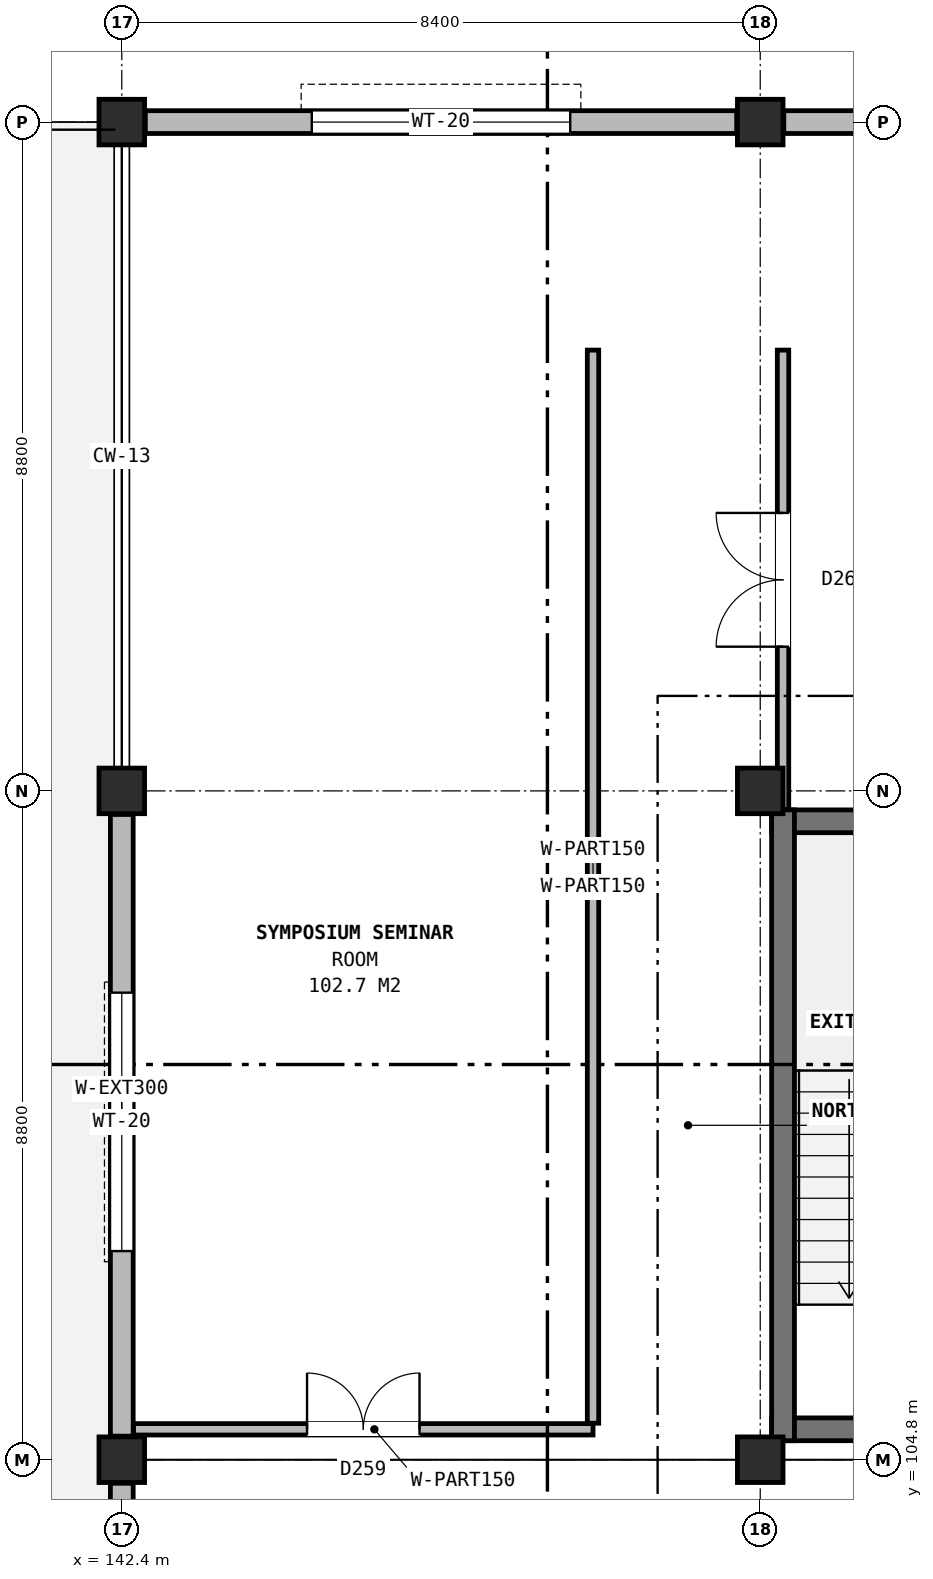
"""IFC4 building model, lengths in metres.
Left out: names, types, materials, properties, quantities, classifications, styles, units other than length and angle.
Written with IfcOpenShell. Run it as: python <this file> out.ifc"""

import sys

from ifc_helpers import new_model, si_unit, direction, frame, frame_2d, origin, origin_2d, place, context, subcontext, project, spatial, rectangle, extrude, element, fill, save


model = new_model("IFC4")
c1 = context("Model", 3, precision=1e-05, world=origin(), true_north=direction((0.0, 1.0)))
c2 = subcontext(c1, "Body", "Model", "MODEL_VIEW")
j1 = project(units=[si_unit("LENGTHUNIT", "METRE"), si_unit("PLANEANGLEUNIT", "RADIAN")], contexts=[c1])
p1 = place(None, origin())
s1 = spatial("IfcSite", under=j1, at=p1, CompositionType="ELEMENT")
p2 = place(p1, origin())
s2 = spatial("IfcBuilding", under=s1, at=p2, CompositionType="ELEMENT")
p3 = place(p2, frame((0.0, 0.0, 48.2)))
s3 = spatial("IfcBuildingStorey", under=s2, at=p3, CompositionType="ELEMENT", Elevation=48.2)
for number, where, z_axis, x_axis in (
    (1, (142.4, 104.8, 0.0), (0.0, 0.0, 1.0), (1.0, 0.0, 0.0)),
    (2, (142.4, 113.6, 0.0), (0.0, 0.0, 1.0), (1.0, 0.0, 0.0)),
    (3, (142.4, 122.4, 0.0), (0.0, 0.0, 1.0), (1.0, 0.0, 0.0)),
    (4, (150.8, 104.8, 0.0), (0.0, 0.0, 1.0), (1.0, 0.0, 0.0)),
    (5, (150.8, 113.6, 0.0), (0.0, 0.0, 1.0), (1.0, 0.0, 0.0)),
    (6, (150.8, 122.4, 0.0), (0.0, 0.0, 1.0), (1.0, 0.0, 0.0)),
):
    element("IfcColumn", number, at=place(p3, frame(where, z_axis=z_axis, x_axis=x_axis)), inside=s3, PredefinedType="COLUMN", context=c2, shape_type="SweptSolid", body=[
        extrude(rectangle(XDim=0.6, YDim=0.6, at=origin_2d()), origin(), (0.0, 0.0, 1.0), 4.0),
    ])
p4 = place(p3, frame((158.89, 122.4, 0.0), z_axis=(0.0, 0.0, 1.0), x_axis=(-1.0, 0.0, 0.0)))
e7 = element("IfcWall", 7, at=p4, inside=s3, PredefinedType="SOLIDWALL", context=c2, shape_type="SweptSolid", body=[
    extrude(rectangle(XDim=7.78, YDim=0.3, at=frame_2d((3.89, 0.0))), origin(), (0.0, 0.0, 1.0), 3.25),
])
p5 = place(p4, frame((2.52, 0.0, 0.9)))
e8 = element("IfcOpeningElement", 8, at=p5, cuts=e7, PredefinedType="OPENING", context=c2, shape_type="SweptSolid", body=[
    extrude(rectangle(XDim=2.74, YDim=2.2, at=frame_2d((1.37, 1.1))), frame((0.0, 0.16, 0.0), z_axis=(0.0, -1.0, 0.0), x_axis=(1.0, 0.0, 0.0)), (0.0, 0.0, 1.0), 0.32),
])
p6 = place(p3, frame((150.49, 122.4, 0.0), z_axis=(0.0, 0.0, 1.0), x_axis=(-1.0, 0.0, 0.0)))
e9 = element("IfcWall", 9, at=p6, inside=s3, PredefinedType="SOLIDWALL", context=c2, shape_type="SweptSolid", body=[
    extrude(rectangle(XDim=7.78, YDim=0.3, at=frame_2d((3.89, 0.0))), origin(), (0.0, 0.0, 1.0), 3.25),
])
p7 = place(p6, frame((2.19, 0.0, 0.9)))
e10 = element("IfcOpeningElement", 10, at=p7, cuts=e9, PredefinedType="OPENING", context=c2, shape_type="SweptSolid", body=[
    extrude(rectangle(XDim=3.4, YDim=2.15, at=frame_2d((1.7, 1.075))), frame((0.0, 0.16, 0.0), z_axis=(0.0, -1.0, 0.0), x_axis=(1.0, 0.0, 0.0)), (0.0, 0.0, 1.0), 0.32),
])
p8 = place(p3, frame((142.4, 113.29, 0.0), z_axis=(0.0, 0.0, 1.0), x_axis=(0.0, -1.0, 0.0)))
e11 = element("IfcWall", 11, at=p8, inside=s3, PredefinedType="SOLIDWALL", context=c2, shape_type="SweptSolid", body=[
    extrude(rectangle(XDim=8.18, YDim=0.3, at=frame_2d((4.09, 0.0))), origin(), (0.0, 0.0, 1.0), 3.25),
])
p9 = place(p8, frame((2.345, 0.0, 0.9)))
e12 = element("IfcOpeningElement", 12, at=p9, cuts=e11, PredefinedType="OPENING", context=c2, shape_type="SweptSolid", body=[
    extrude(rectangle(XDim=3.4, YDim=2.15, at=frame_2d((1.7, 1.075))), frame((0.0, 0.16, 0.0), z_axis=(0.0, -1.0, 0.0), x_axis=(1.0, 0.0, 0.0)), (0.0, 0.0, 1.0), 0.32),
])
p10 = place(p3, frame((142.4, 104.49, 0.0), z_axis=(0.0, 0.0, 1.0), x_axis=(0.0, -1.0, 0.0)))
e13 = element("IfcWall", 13, at=p10, inside=s3, PredefinedType="SOLIDWALL", context=c2, shape_type="SweptSolid", body=[
    extrude(rectangle(XDim=8.18, YDim=0.3, at=frame_2d((4.09, 0.0))), origin(), (0.0, 0.0, 1.0), 3.25),
])
p11 = place(p10, frame((3.415, 0.0, 0.0)))
e14 = element("IfcOpeningElement", 14, at=p11, cuts=e13, PredefinedType="OPENING", context=c2, shape_type="SweptSolid", body=[
    extrude(rectangle(XDim=1.35, YDim=2.25, at=frame_2d((0.675, 1.125))), frame((0.0, 0.16, 0.0), z_axis=(0.0, -1.0, 0.0), x_axis=(1.0, 0.0, 0.0)), (0.0, 0.0, 1.0), 0.32),
])
for number, where, z_axis, x_axis in (
    (15, (150.95, 105.2, 0.0), (0.0, 0.0, 1.0), (1.0, 0.0, 0.0)),
    (16, (150.95, 113.2, 0.0), (0.0, 0.0, 1.0), (1.0, 0.0, 0.0)),
):
    element("IfcWall", number, at=place(p3, frame(where, z_axis=z_axis, x_axis=x_axis)), inside=s3, PredefinedType="SHEAR", context=c2, shape_type="SweptSolid", body=[
        extrude(rectangle(XDim=3.6, YDim=0.3, at=frame_2d((1.8, 0.0))), origin(), (0.0, 0.0, 1.0), 4.0),
    ])
p12 = place(p3, frame((151.1, 105.05, 0.0), z_axis=(0.0, 0.0, 1.0), x_axis=(0.0, 1.0, 0.0)))
e17 = element("IfcWall", 17, at=p12, inside=s3, PredefinedType="SHEAR", context=c2, shape_type="SweptSolid", body=[
    extrude(rectangle(XDim=8.3, YDim=0.3, at=frame_2d((4.15, 0.0))), origin(), (0.0, 0.0, 1.0), 4.0),
])
p13 = place(p3, frame((142.555, 105.2, 0.0), z_axis=(0.0, 0.0, 1.0), x_axis=(1.0, 0.0, 0.0)))
e18 = element("IfcWall", 18, at=p13, inside=s3, PredefinedType="PARTITIONING", context=c2, shape_type="SweptSolid", body=[
    extrude(rectangle(XDim=6.045, YDim=0.15, at=frame_2d((3.022, 0.0))), origin(), (0.0, 0.0, 1.0), 3.245),
])
p14 = place(p13, frame((2.282, 0.0, 0.0)))
e19 = element("IfcOpeningElement", 19, at=p14, cuts=e18, PredefinedType="OPENING", context=c2, shape_type="SweptSolid", body=[
    extrude(rectangle(XDim=1.48, YDim=2.2, at=frame_2d((0.74, 1.1))), frame((0.0, 0.085, 0.0), z_axis=(0.0, -1.0, 0.0), x_axis=(1.0, 0.0, 0.0)), (0.0, 0.0, 1.0), 0.17),
])
p15 = place(p3, frame((148.6, 105.28, 0.0), z_axis=(0.0, 0.0, 1.0), x_axis=(0.0, 1.0, 0.0)))
e20 = element("IfcWall", 20, at=p15, inside=s3, PredefinedType="PARTITIONING", context=c2, shape_type="SweptSolid", body=[
    extrude(rectangle(XDim=14.12, YDim=0.15, at=frame_2d((7.06, 0.0))), origin(), (0.0, 0.0, 1.0), 3.665),
])
p16 = place(p3, frame((151.1, 113.355, 0.0), z_axis=(0.0, 0.0, 1.0), x_axis=(0.0, 1.0, 0.0)))
e21 = element("IfcWall", 21, at=p16, inside=s3, PredefinedType="PARTITIONING", context=c2, shape_type="SweptSolid", body=[
    extrude(rectangle(XDim=6.045, YDim=0.15, at=frame_2d((3.022, 0.0))), origin(), (0.0, 0.0, 1.0), 3.245),
])
p17 = place(p16, frame((2.143, 0.0, 0.0)))
e22 = element("IfcOpeningElement", 22, at=p17, cuts=e21, PredefinedType="OPENING", context=c2, shape_type="SweptSolid", body=[
    extrude(rectangle(XDim=1.76, YDim=2.36, at=frame_2d((0.88, 1.18))), frame((0.0, 0.085, 0.0), z_axis=(0.0, -1.0, 0.0), x_axis=(1.0, 0.0, 0.0)), (0.0, 0.0, 1.0), 0.17),
])
p18 = place(p7, origin())
e23 = element("IfcWindow", 23, at=p18, inside=s3, PartitioningType="SINGLE_PANEL", PredefinedType="WINDOW", context=c2, shape_type="SweptSolid", body=[
    extrude(rectangle(XDim=3.4, YDim=2.15, at=frame_2d((1.7, 1.075))), frame((0.0, 0.03, 0.0), z_axis=(0.0, -1.0, 0.0), x_axis=(1.0, 0.0, 0.0)), (0.0, 0.0, 1.0), 0.06),
])
fill(e10, e23)
p19 = place(p9, origin())
e24 = element("IfcWindow", 24, at=p19, inside=s3, PartitioningType="SINGLE_PANEL", PredefinedType="WINDOW", context=c2, shape_type="SweptSolid", body=[
    extrude(rectangle(XDim=3.4, YDim=2.15, at=frame_2d((1.7, 1.075))), frame((0.0, 0.03, 0.0), z_axis=(0.0, -1.0, 0.0), x_axis=(1.0, 0.0, 0.0)), (0.0, 0.0, 1.0), 0.06),
])
fill(e12, e24)
p20 = place(p14, origin())
e25 = element("IfcDoor", 25, at=p20, inside=s3, OperationType="DOUBLE_DOOR_SINGLE_SWING", PredefinedType="DOOR", context=c2, shape_type="SweptSolid", body=[
    extrude(rectangle(XDim=1.48, YDim=2.2, at=frame_2d((0.74, 1.1))), frame((0.0, 0.025, 0.0), z_axis=(0.0, -1.0, 0.0), x_axis=(1.0, 0.0, 0.0)), (0.0, 0.0, 1.0), 0.05),
])
fill(e19, e25)
p21 = place(p17, origin())
e26 = element("IfcDoor", 26, at=p21, inside=s3, OperationType="DOUBLE_DOOR_SINGLE_SWING", PredefinedType="DOOR", context=c2, shape_type="SweptSolid", body=[
    extrude(rectangle(XDim=1.76, YDim=2.36, at=frame_2d((0.88, 1.18))), frame((0.0, 0.025, 0.0), z_axis=(0.0, -1.0, 0.0), x_axis=(1.0, 0.0, 0.0)), (0.0, 0.0, 1.0), 0.05),
])
fill(e22, e26)
save(model, sys.argv[1])
